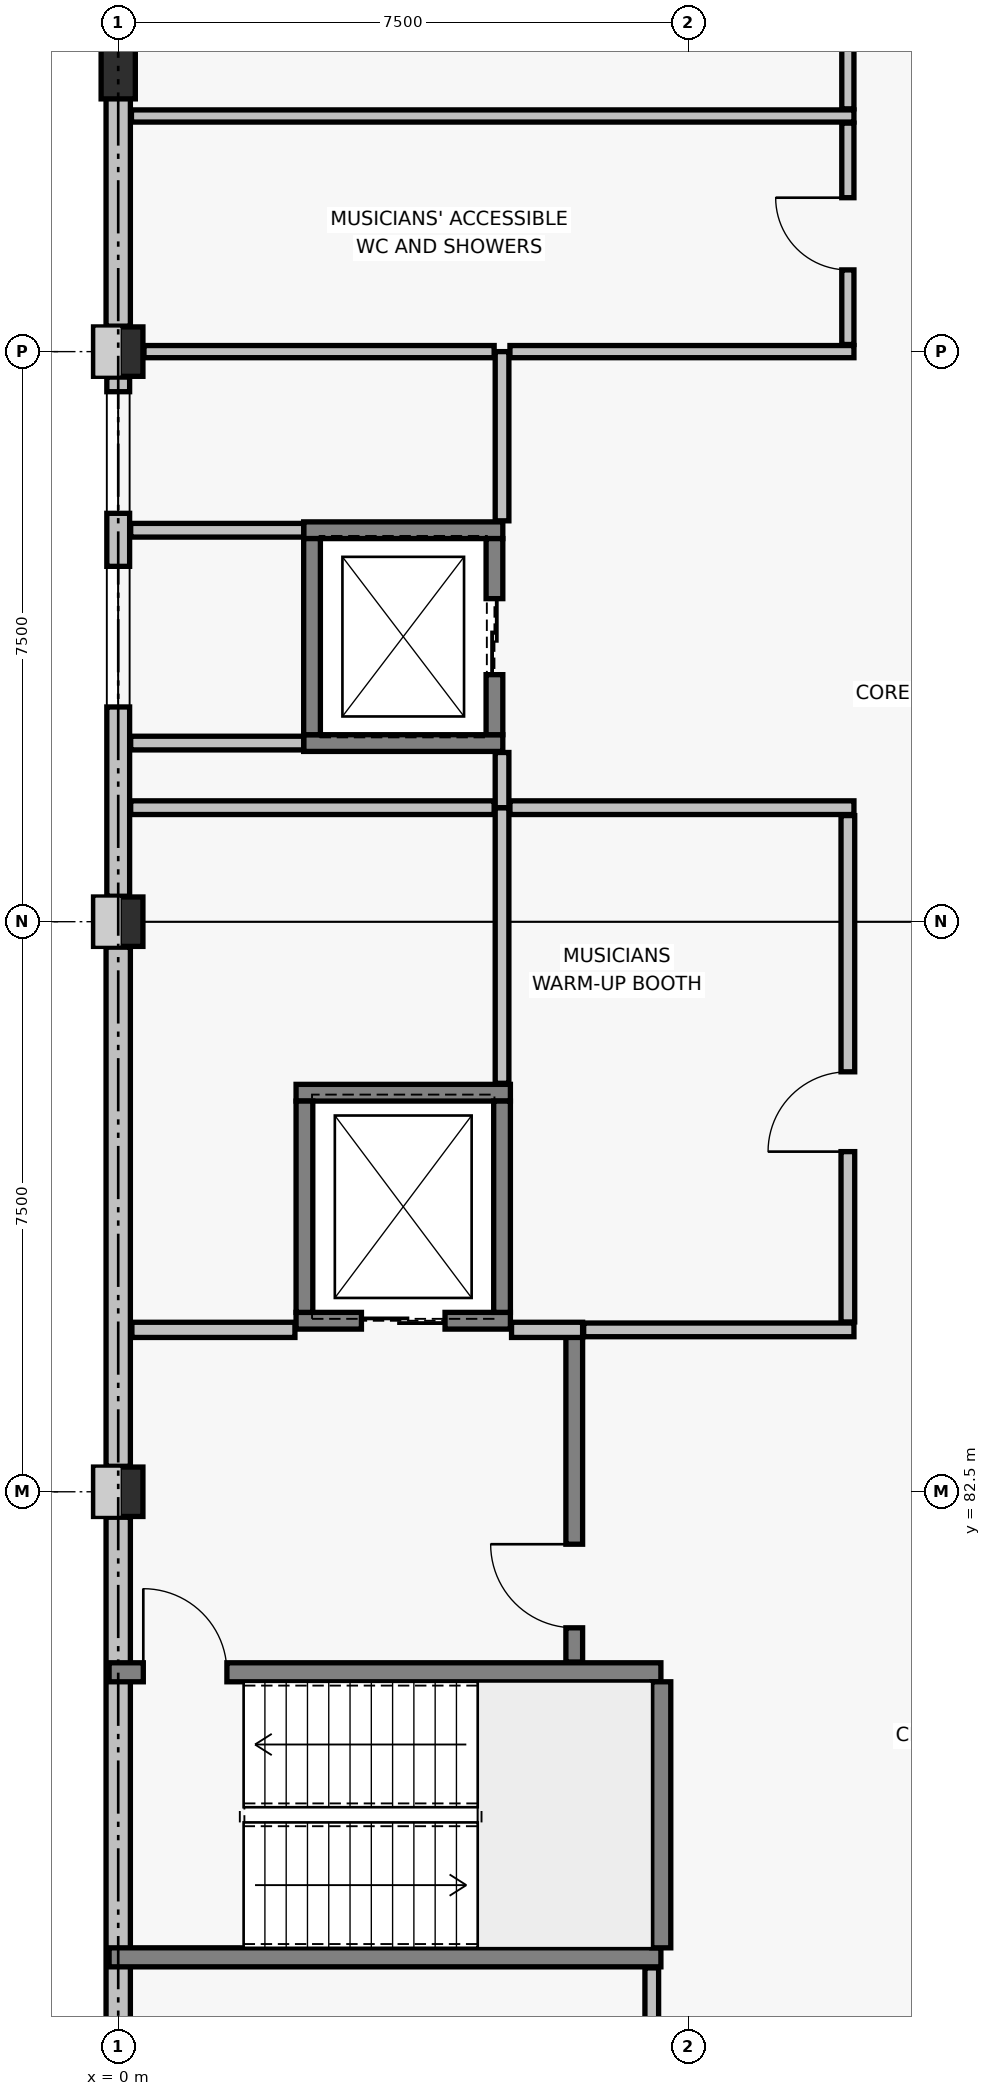
"""IFC4 building model, lengths in metres.
Left out: names, types, materials, properties, quantities, classifications, styles, units other than length and angle.
Written with IfcOpenShell. Run it as: python <this file> out.ifc"""

import sys

from ifc_helpers import new_model, si_unit, direction, frame, frame_2d, origin, origin_2d, place, context, subcontext, project, spatial, rectangle, extrude, element, fill, save


model = new_model("IFC4")
c1 = context("Model", 3, precision=1e-05, world=origin(), true_north=direction((0.0, 1.0)))
c2 = subcontext(c1, "Body", "Model", "MODEL_VIEW")
j1 = project(units=[si_unit("LENGTHUNIT", "METRE"), si_unit("PLANEANGLEUNIT", "RADIAN")], contexts=[c1])
p1 = place(None, origin())
s1 = spatial("IfcSite", under=j1, at=p1, CompositionType="ELEMENT")
p2 = place(p1, origin())
s2 = spatial("IfcBuilding", under=s1, at=p2, CompositionType="ELEMENT")
p3 = place(p2, frame((0.0, 0.0, 4.8)))
s3 = spatial("IfcBuildingStorey", under=s2, at=p3, CompositionType="ELEMENT", Elevation=4.8)
for number, where, z_axis, x_axis in (
    (1, (0.0, 82.5, 0.0), (0.0, 0.0, 1.0), (1.0, 0.0, 0.0)),
    (2, (0.0, 90.0, 0.0), (0.0, 0.0, 1.0), (1.0, 0.0, 0.0)),
    (3, (0.0, 97.5, 0.0), (0.0, 0.0, 1.0), (1.0, 0.0, 0.0)),
):
    element("IfcColumn", number, at=place(p3, frame(where, z_axis=z_axis, x_axis=x_axis)), inside=s3, PredefinedType="COLUMN", context=c2, shape_type="SweptSolid", body=[
        extrude(rectangle(XDim=0.65, YDim=0.65, at=origin_2d()), origin(), (0.0, 0.0, 1.0), 4.2),
    ])
p4 = place(p3, frame((0.0, 101.25, 0.0), z_axis=(0.0, 0.0, 1.0), x_axis=(1.0, 0.0, 0.0)))
e4 = element("IfcColumn", 4, at=p4, inside=s3, PredefinedType="PILASTER", context=c2, shape_type="SweptSolid", body=[
    extrude(rectangle(XDim=0.45, YDim=0.85, at=origin_2d()), origin(), (0.0, 0.0, 1.0), 4.2),
])
for number, where, z_axis, x_axis in (
    (5, (0.0, 75.335, 0.0), (0.0, 0.0, 1.0), (0.0, 1.0, 0.0)),
    (6, (0.0, 82.835, 0.0), (0.0, 0.0, 1.0), (0.0, 1.0, 0.0)),
):
    element("IfcWall", number, at=place(p3, frame(where, z_axis=z_axis, x_axis=x_axis)), inside=s3, PredefinedType="SOLIDWALL", context=c2, shape_type="SweptSolid", body=[
        extrude(rectangle(XDim=6.83, YDim=0.32, at=frame_2d((3.415, 0.0))), origin(), (0.0, 0.0, 1.0), 2.89),
    ])
p5 = place(p3, frame((0.0, 90.335, 0.0), z_axis=(0.0, 0.0, 1.0), x_axis=(0.0, 1.0, 0.0)))
e7 = element("IfcWall", 7, at=p5, inside=s3, PredefinedType="SOLIDWALL", context=c2, shape_type="SweptSolid", body=[
    extrude(rectangle(XDim=6.83, YDim=0.3, at=frame_2d((3.415, 0.0))), origin(), (0.0, 0.0, 1.0), 2.89),
])
p6 = place(p5, frame((2.49, 0.0, 0.6)))
e8 = element("IfcOpeningElement", 8, at=p6, cuts=e7, PredefinedType="OPENING", context=c2, shape_type="SweptSolid", body=[
    extrude(rectangle(XDim=1.85, YDim=1.8, at=frame_2d((0.925, 0.9))), frame((0.0, 0.16, 0.0), z_axis=(0.0, -1.0, 0.0), x_axis=(1.0, 0.0, 0.0)), (0.0, 0.0, 1.0), 0.32),
])
p7 = place(p5, frame((5.038, 0.0, 0.6)))
e9 = element("IfcOpeningElement", 9, at=p7, cuts=e7, PredefinedType="OPENING", context=c2, shape_type="SweptSolid", body=[
    extrude(rectangle(XDim=1.6, YDim=1.3, at=frame_2d((0.8, 0.65))), frame((0.0, 0.16, 0.0), z_axis=(0.0, -1.0, 0.0), x_axis=(1.0, 0.0, 0.0)), (0.0, 0.0, 1.0), 0.32),
])
p8 = place(p3, frame((0.0, 97.835, 0.0), z_axis=(0.0, 0.0, 1.0), x_axis=(0.0, 1.0, 0.0)))
e10 = element("IfcWall", 10, at=p8, inside=s3, PredefinedType="SOLIDWALL", context=c2, shape_type="SweptSolid", body=[
    extrude(rectangle(XDim=6.83, YDim=0.32, at=frame_2d((3.415, 0.0))), origin(), (0.0, 0.0, 1.0), 2.89),
])
p9 = place(p3, frame((-0.12, 76.375, 0.0), z_axis=(0.0, 0.0, 1.0), x_axis=(1.0, 0.0, 0.0)))
e11 = element("IfcWall", 11, at=p9, inside=s3, PredefinedType="SOLIDWALL", context=c2, shape_type="SweptSolid", body=[
    extrude(rectangle(XDim=7.26, YDim=0.25, at=frame_2d((3.63, 0.0))), origin(), (0.0, 0.0, 1.0), 3.92),
])
p10 = place(p3, frame((-0.12, 80.125, 0.0), z_axis=(0.0, 0.0, 1.0), x_axis=(1.0, 0.0, 0.0)))
e12 = element("IfcWall", 12, at=p10, inside=s3, PredefinedType="SOLIDWALL", context=c2, shape_type="SweptSolid", body=[
    extrude(rectangle(XDim=7.26, YDim=0.25, at=frame_2d((3.63, 0.0))), origin(), (0.0, 0.0, 1.0), 3.92),
])
p11 = place(p10, frame((0.45, 0.0, 0.0)))
e13 = element("IfcOpeningElement", 13, at=p11, cuts=e12, PredefinedType="OPENING", context=c2, shape_type="SweptSolid", body=[
    extrude(rectangle(XDim=1.1, YDim=2.15, at=frame_2d((0.55, 1.075))), frame((0.0, 0.135, 0.0), z_axis=(0.0, -1.0, 0.0), x_axis=(1.0, 0.0, 0.0)), (0.0, 0.0, 1.0), 0.27),
])
p12 = place(p3, frame((7.145, 76.5, 0.0), z_axis=(0.0, 0.0, 1.0), x_axis=(0.0, 1.0, 0.0)))
e14 = element("IfcWall", 14, at=p12, inside=s3, PredefinedType="SOLIDWALL", context=c2, shape_type="SweptSolid", body=[
    extrude(rectangle(XDim=3.5, YDim=0.25, at=frame_2d((1.75, 0.0))), origin(), (0.0, 0.0, 1.0), 3.92),
])
for number, where, z_axis, x_axis in (
    (15, (2.44, 92.35, 0.0), (0.0, 0.0, 1.0), (1.0, 0.0, 0.0)),
    (16, (2.44, 95.15, 0.0), (0.0, 0.0, 1.0), (1.0, 0.0, 0.0)),
):
    element("IfcWall", number, at=place(p3, frame(where, z_axis=z_axis, x_axis=x_axis)), inside=s3, PredefinedType="SOLIDWALL", context=c2, shape_type="SweptSolid", body=[
        extrude(rectangle(XDim=2.62, YDim=0.22, at=frame_2d((1.31, 0.0))), origin(), (0.0, 0.0, 1.0), 3.92),
    ])
p13 = place(p3, frame((2.55, 92.46, 0.0), z_axis=(0.0, 0.0, 1.0), x_axis=(0.0, 1.0, 0.0)))
e17 = element("IfcWall", 17, at=p13, inside=s3, PredefinedType="SOLIDWALL", context=c2, shape_type="SweptSolid", body=[
    extrude(rectangle(XDim=2.58, YDim=0.22, at=frame_2d((1.29, 0.0))), origin(), (0.0, 0.0, 1.0), 3.92),
])
p14 = place(p3, frame((4.95, 92.46, 0.0), z_axis=(0.0, 0.0, 1.0), x_axis=(0.0, 1.0, 0.0)))
e18 = element("IfcWall", 18, at=p14, inside=s3, PredefinedType="SOLIDWALL", context=c2, shape_type="SweptSolid", body=[
    extrude(rectangle(XDim=2.58, YDim=0.22, at=frame_2d((1.29, 0.0))), origin(), (0.0, 0.0, 1.0), 3.92),
])
p15 = place(p14, frame((0.79, 0.0, 0.0)))
e19 = element("IfcOpeningElement", 19, at=p15, cuts=e18, PredefinedType="OPENING", context=c2, shape_type="SweptSolid", body=[
    extrude(rectangle(XDim=1.0, YDim=2.15, at=frame_2d((0.5, 1.075))), frame((0.0, 0.12, 0.0), z_axis=(0.0, -1.0, 0.0), x_axis=(1.0, 0.0, 0.0)), (0.0, 0.0, 1.0), 0.24),
])
p16 = place(p3, frame((2.34, 84.75, 0.0), z_axis=(0.0, 0.0, 1.0), x_axis=(1.0, 0.0, 0.0)))
e20 = element("IfcWall", 20, at=p16, inside=s3, PredefinedType="SOLIDWALL", context=c2, shape_type="SweptSolid", body=[
    extrude(rectangle(XDim=2.82, YDim=0.22, at=frame_2d((1.41, 0.0))), origin(), (0.0, 0.0, 1.0), 3.92),
])
p17 = place(p16, frame((0.86, 0.0, 0.0)))
e21 = element("IfcOpeningElement", 21, at=p17, cuts=e20, PredefinedType="OPENING", context=c2, shape_type="SweptSolid", body=[
    extrude(rectangle(XDim=1.1, YDim=2.15, at=frame_2d((0.55, 1.075))), frame((0.0, 0.12, 0.0), z_axis=(0.0, -1.0, 0.0), x_axis=(1.0, 0.0, 0.0)), (0.0, 0.0, 1.0), 0.24),
])
p18 = place(p3, frame((2.34, 87.75, 0.0), z_axis=(0.0, 0.0, 1.0), x_axis=(1.0, 0.0, 0.0)))
e22 = element("IfcWall", 22, at=p18, inside=s3, PredefinedType="SOLIDWALL", context=c2, shape_type="SweptSolid", body=[
    extrude(rectangle(XDim=2.82, YDim=0.22, at=frame_2d((1.41, 0.0))), origin(), (0.0, 0.0, 1.0), 3.92),
])
for number, where, z_axis, x_axis in (
    (23, (2.45, 84.86, 0.0), (0.0, 0.0, 1.0), (0.0, 1.0, 0.0)),
    (24, (5.05, 84.86, 0.0), (0.0, 0.0, 1.0), (0.0, 1.0, 0.0)),
):
    element("IfcWall", number, at=place(p3, frame(where, z_axis=z_axis, x_axis=x_axis)), inside=s3, PredefinedType="SOLIDWALL", context=c2, shape_type="SweptSolid", body=[
        extrude(rectangle(XDim=2.78, YDim=0.22, at=frame_2d((1.39, 0.0))), origin(), (0.0, 0.0, 1.0), 3.92),
    ])
p19 = place(p3, frame((6.0, 80.26, 0.0), z_axis=(0.0, 0.0, 1.0), x_axis=(0.0, 1.0, 0.0)))
e25 = element("IfcWall", 25, at=p19, inside=s3, PredefinedType="SOLIDWALL", context=c2, shape_type="SweptSolid", body=[
    extrude(rectangle(XDim=4.37, YDim=0.22, at=frame_2d((2.185, 0.0))), origin(), (0.0, 0.0, 1.0), 3.92),
])
p20 = place(p19, frame((0.45, 0.0, 0.0)))
e26 = element("IfcOpeningElement", 26, at=p20, cuts=e25, PredefinedType="OPENING", context=c2, shape_type="SweptSolid", body=[
    extrude(rectangle(XDim=1.1, YDim=2.15, at=frame_2d((0.55, 1.075))), frame((0.0, 0.12, 0.0), z_axis=(0.0, -1.0, 0.0), x_axis=(1.0, 0.0, 0.0)), (0.0, 0.0, 1.0), 0.24),
])
p21 = place(p3, frame((0.18, 84.63, 0.0), z_axis=(0.0, 0.0, 1.0), x_axis=(1.0, 0.0, 0.0)))
e27 = element("IfcWall", 27, at=p21, inside=s3, PredefinedType="PARTITIONING", context=c2, shape_type="SweptSolid", body=[
    extrude(rectangle(XDim=2.145, YDim=0.2, at=frame_2d((1.073, 0.0))), origin(), (0.0, 0.0, 1.0), 3.15),
])
p22 = place(p3, frame((5.175, 84.63, 0.0), z_axis=(0.0, 0.0, 1.0), x_axis=(1.0, 0.0, 0.0)))
e28 = element("IfcWall", 28, at=p22, inside=s3, PredefinedType="PARTITIONING", context=c2, shape_type="SweptSolid", body=[
    extrude(rectangle(XDim=0.935, YDim=0.2, at=frame_2d((0.468, 0.0))), origin(), (0.0, 0.0, 1.0), 3.6),
])
p23 = place(p3, frame((7.02, 75.0, 0.0), z_axis=(0.0, 0.0, 1.0), x_axis=(0.0, 1.0, 0.0)))
e29 = element("IfcWall", 29, at=p23, inside=s3, PredefinedType="PARTITIONING", context=c2, shape_type="SweptSolid", body=[
    extrude(rectangle(XDim=1.236, YDim=0.18, at=frame_2d((0.618, 0.0))), origin(), (0.0, 0.0, 1.0), 2.89),
])
p24 = place(p3, frame((5.05, 87.874, 0.0), z_axis=(0.0, 0.0, 1.0), x_axis=(0.0, 1.0, 0.0)))
e30 = element("IfcWall", 30, at=p24, inside=s3, PredefinedType="PARTITIONING", context=c2, shape_type="SweptSolid", body=[
    extrude(rectangle(XDim=3.626, YDim=0.18, at=frame_2d((1.813, 0.0))), origin(), (0.0, 0.0, 1.0), 2.89),
])
p25 = place(p3, frame((6.124, 84.63, 0.0), z_axis=(0.0, 0.0, 1.0), x_axis=(1.0, 0.0, 0.0)))
e31 = element("IfcWall", 31, at=p25, inside=s3, PredefinedType="PARTITIONING", context=c2, shape_type="SweptSolid", body=[
    extrude(rectangle(XDim=3.556, YDim=0.18, at=frame_2d((1.778, 0.0))), origin(), (0.0, 0.0, 1.0), 3.27),
])
p26 = place(p3, frame((0.164, 91.5, 0.0), z_axis=(0.0, 0.0, 1.0), x_axis=(1.0, 0.0, 0.0)))
e32 = element("IfcWall", 32, at=p26, inside=s3, PredefinedType="PARTITIONING", context=c2, shape_type="SweptSolid", body=[
    extrude(rectangle(XDim=4.782, YDim=0.18, at=frame_2d((2.391, 0.0))), origin(), (0.0, 0.0, 1.0), 3.27),
])
p27 = place(p3, frame((5.154, 91.5, 0.0), z_axis=(0.0, 0.0, 1.0), x_axis=(1.0, 0.0, 0.0)))
e33 = element("IfcWall", 33, at=p27, inside=s3, PredefinedType="PARTITIONING", context=c2, shape_type="SweptSolid", body=[
    extrude(rectangle(XDim=4.526, YDim=0.18, at=frame_2d((2.263, 0.0))), origin(), (0.0, 0.0, 1.0), 3.27),
])
p28 = place(p3, frame((9.6, 84.734, 0.0), z_axis=(0.0, 0.0, 1.0), x_axis=(0.0, 1.0, 0.0)))
e34 = element("IfcWall", 34, at=p28, inside=s3, PredefinedType="PARTITIONING", context=c2, shape_type="SweptSolid", body=[
    extrude(rectangle(XDim=6.662, YDim=0.18, at=frame_2d((3.331, 0.0))), origin(), (0.0, 0.0, 1.0), 2.89),
])
p29 = place(p28, frame((2.241, 0.0, 0.0)))
e35 = element("IfcOpeningElement", 35, at=p29, cuts=e34, PredefinedType="OPENING", context=c2, shape_type="SweptSolid", body=[
    extrude(rectangle(XDim=1.05, YDim=2.12, at=frame_2d((0.525, 1.06))), frame((0.0, 0.1, 0.0), z_axis=(0.0, -1.0, 0.0), x_axis=(1.0, 0.0, 0.0)), (0.0, 0.0, 1.0), 0.2),
])
for number, where, z_axis, x_axis in (
    (36, (0.164, 92.35, 0.0), (0.0, 0.0, 1.0), (1.0, 0.0, 0.0)),
    (37, (0.164, 95.15, 0.0), (0.0, 0.0, 1.0), (1.0, 0.0, 0.0)),
):
    element("IfcWall", number, at=place(p3, frame(where, z_axis=z_axis, x_axis=x_axis)), inside=s3, PredefinedType="PARTITIONING", context=c2, shape_type="SweptSolid", body=[
        extrude(rectangle(XDim=2.276, YDim=0.18, at=frame_2d((1.138, 0.0))), origin(), (0.0, 0.0, 1.0), 3.27),
    ])
p30 = place(p3, frame((5.05, 91.5, 0.0), z_axis=(0.0, 0.0, 1.0), x_axis=(0.0, 1.0, 0.0)))
e38 = element("IfcWall", 38, at=p30, inside=s3, PredefinedType="PARTITIONING", context=c2, shape_type="SweptSolid", body=[
    extrude(rectangle(XDim=0.726, YDim=0.18, at=frame_2d((0.363, 0.0))), origin(), (0.0, 0.0, 1.0), 3.27),
])
p31 = place(p3, frame((5.05, 95.274, 0.0), z_axis=(0.0, 0.0, 1.0), x_axis=(0.0, 1.0, 0.0)))
e39 = element("IfcWall", 39, at=p31, inside=s3, PredefinedType="PARTITIONING", context=c2, shape_type="SweptSolid", body=[
    extrude(rectangle(XDim=2.226, YDim=0.18, at=frame_2d((1.113, 0.0))), origin(), (0.0, 0.0, 1.0), 2.89),
])
p32 = place(p3, frame((0.339, 97.5, 0.0), z_axis=(0.0, 0.0, 1.0), x_axis=(1.0, 0.0, 0.0)))
e40 = element("IfcWall", 40, at=p32, inside=s3, PredefinedType="PARTITIONING", context=c2, shape_type="SweptSolid", body=[
    extrude(rectangle(XDim=4.607, YDim=0.16, at=frame_2d((2.303, 0.0))), origin(), (0.0, 0.0, 1.0), 2.89),
])
p33 = place(p3, frame((5.154, 97.5, 0.0), z_axis=(0.0, 0.0, 1.0), x_axis=(1.0, 0.0, 0.0)))
e41 = element("IfcWall", 41, at=p33, inside=s3, PredefinedType="PARTITIONING", context=c2, shape_type="SweptSolid", body=[
    extrude(rectangle(XDim=4.526, YDim=0.16, at=frame_2d((2.263, 0.0))), origin(), (0.0, 0.0, 1.0), 2.89),
])
p34 = place(p3, frame((0.174, 100.6, 0.0), z_axis=(0.0, 0.0, 1.0), x_axis=(1.0, 0.0, 0.0)))
e42 = element("IfcWall", 42, at=p34, inside=s3, PredefinedType="PARTITIONING", context=c2, shape_type="SweptSolid", body=[
    extrude(rectangle(XDim=9.506, YDim=0.16, at=frame_2d((4.753, 0.0))), origin(), (0.0, 0.0, 1.0), 3.14),
])
p35 = place(p3, frame((9.6, 97.594, 0.0), z_axis=(0.0, 0.0, 1.0), x_axis=(0.0, 1.0, 0.0)))
e43 = element("IfcWall", 43, at=p35, inside=s3, PredefinedType="PARTITIONING", context=c2, shape_type="SweptSolid", body=[
    extrude(rectangle(XDim=2.912, YDim=0.16, at=frame_2d((1.456, 0.0))), origin(), (0.0, 0.0, 1.0), 2.89),
])
p36 = place(p35, frame((0.981, 0.0, 0.0)))
e44 = element("IfcOpeningElement", 44, at=p36, cuts=e43, PredefinedType="OPENING", context=c2, shape_type="SweptSolid", body=[
    extrude(rectangle(XDim=0.95, YDim=2.1, at=frame_2d((0.475, 1.05))), frame((0.0, 0.09, 0.0), z_axis=(0.0, -1.0, 0.0), x_axis=(1.0, 0.0, 0.0)), (0.0, 0.0, 1.0), 0.18),
])
p37 = place(p3, frame((9.6, 100.694, 0.0), z_axis=(0.0, 0.0, 1.0), x_axis=(0.0, 1.0, 0.0)))
e45 = element("IfcWall", 45, at=p37, inside=s3, PredefinedType="PARTITIONING", context=c2, shape_type="SweptSolid", body=[
    extrude(rectangle(XDim=11.642, YDim=0.16, at=frame_2d((5.821, 0.0))), origin(), (0.0, 0.0, 1.0), 2.89),
])
p38 = place(p37, frame((5.281, 0.0, 0.0)))
e46 = element("IfcOpeningElement", 46, at=p38, cuts=e45, PredefinedType="OPENING", context=c2, shape_type="SweptSolid", body=[
    extrude(rectangle(XDim=1.05, YDim=2.12, at=frame_2d((0.525, 1.06))), frame((0.0, 0.09, 0.0), z_axis=(0.0, -1.0, 0.0), x_axis=(1.0, 0.0, 0.0)), (0.0, 0.0, 1.0), 0.18),
])
p39 = place(p6, origin())
e47 = element("IfcWindow", 47, at=p39, inside=s3, PartitioningType="SINGLE_PANEL", PredefinedType="WINDOW", context=c2, shape_type="SweptSolid", body=[
    extrude(rectangle(XDim=1.85, YDim=1.8, at=frame_2d((0.925, 0.9))), frame((0.0, 0.03, 0.0), z_axis=(0.0, -1.0, 0.0), x_axis=(1.0, 0.0, 0.0)), (0.0, 0.0, 1.0), 0.06),
])
fill(e8, e47)
p40 = place(p7, origin())
e48 = element("IfcWindow", 48, at=p40, inside=s3, PartitioningType="SINGLE_PANEL", PredefinedType="WINDOW", context=c2, shape_type="SweptSolid", body=[
    extrude(rectangle(XDim=1.6, YDim=1.3, at=frame_2d((0.8, 0.65))), frame((0.0, 0.03, 0.0), z_axis=(0.0, -1.0, 0.0), x_axis=(1.0, 0.0, 0.0)), (0.0, 0.0, 1.0), 0.06),
])
fill(e9, e48)
p41 = place(p11, origin())
e49 = element("IfcDoor", 49, at=p41, inside=s3, OperationType="SINGLE_SWING_LEFT", PredefinedType="DOOR", context=c2, shape_type="SweptSolid", body=[
    extrude(rectangle(XDim=1.1, YDim=2.15, at=frame_2d((0.55, 1.075))), frame((0.0, 0.025, 0.0), z_axis=(0.0, -1.0, 0.0), x_axis=(1.0, 0.0, 0.0)), (0.0, 0.0, 1.0), 0.05),
])
fill(e13, e49)
p42 = place(p15, origin())
e50 = element("IfcDoor", 50, at=p42, inside=s3, OperationType="SLIDING_TO_LEFT", PredefinedType="DOOR", context=c2, shape_type="SweptSolid", body=[
    extrude(rectangle(XDim=1.0, YDim=2.15, at=frame_2d((0.5, 1.075))), frame((0.0, 0.025, 0.0), z_axis=(0.0, -1.0, 0.0), x_axis=(1.0, 0.0, 0.0)), (0.0, 0.0, 1.0), 0.05),
])
fill(e19, e50)
p43 = place(p17, origin())
e51 = element("IfcDoor", 51, at=p43, inside=s3, OperationType="SLIDING_TO_LEFT", PredefinedType="DOOR", context=c2, shape_type="SweptSolid", body=[
    extrude(rectangle(XDim=1.1, YDim=2.15, at=frame_2d((0.55, 1.075))), frame((0.0, 0.025, 0.0), z_axis=(0.0, -1.0, 0.0), x_axis=(1.0, 0.0, 0.0)), (0.0, 0.0, 1.0), 0.05),
])
fill(e21, e51)
p44 = place(p20, origin())
e52 = element("IfcDoor", 52, at=p44, inside=s3, OperationType="SINGLE_SWING_RIGHT", PredefinedType="DOOR", context=c2, shape_type="SweptSolid", body=[
    extrude(rectangle(XDim=1.1, YDim=2.15, at=frame_2d((0.55, 1.075))), frame((0.0, 0.025, 0.0), z_axis=(0.0, -1.0, 0.0), x_axis=(1.0, 0.0, 0.0)), (0.0, 0.0, 1.0), 0.05),
])
fill(e26, e52)
p45 = place(p29, origin())
e53 = element("IfcDoor", 53, at=p45, inside=s3, OperationType="SINGLE_SWING_LEFT", PredefinedType="DOOR", context=c2, shape_type="SweptSolid", body=[
    extrude(rectangle(XDim=1.05, YDim=2.12, at=frame_2d((0.525, 1.06))), frame((0.0, 0.025, 0.0), z_axis=(0.0, -1.0, 0.0), x_axis=(1.0, 0.0, 0.0)), (0.0, 0.0, 1.0), 0.05),
])
fill(e35, e53)
p46 = place(p36, origin())
e54 = element("IfcDoor", 54, at=p46, inside=s3, OperationType="SINGLE_SWING_RIGHT", PredefinedType="DOOR", context=c2, shape_type="SweptSolid", body=[
    extrude(rectangle(XDim=0.95, YDim=2.1, at=frame_2d((0.475, 1.05))), frame((0.0, 0.025, 0.0), z_axis=(0.0, -1.0, 0.0), x_axis=(1.0, 0.0, 0.0)), (0.0, 0.0, 1.0), 0.05),
])
fill(e44, e54)
save(model, sys.argv[1])
